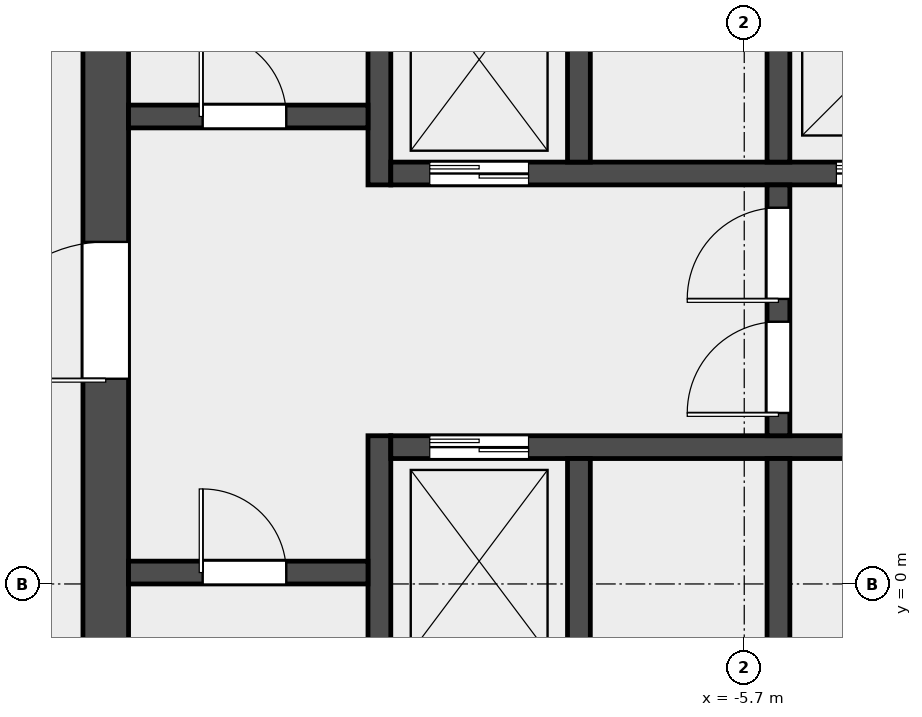
"""IFC4 building model, lengths in metres.
Left out: names, types, materials, properties, quantities, classifications, styles, units other than length and angle.
Written with IfcOpenShell. Run it as: python <this file> out.ifc"""

import sys

from ifc_helpers import new_model, si_unit, direction, frame, frame_2d, origin, place, context, subcontext, project, spatial, rectangle, extrude, element, fill, save


model = new_model("IFC4")
c1 = context("Model", 3, precision=1e-05, world=origin(), true_north=direction((0.0, 1.0)))
c2 = subcontext(c1, "Body", "Model", "MODEL_VIEW")
j1 = project(units=[si_unit("LENGTHUNIT", "METRE"), si_unit("PLANEANGLEUNIT", "RADIAN")], contexts=[c1])
p1 = place(None, origin())
s1 = spatial("IfcSite", under=j1, at=p1, CompositionType="ELEMENT")
p2 = place(p1, origin())
s2 = spatial("IfcBuilding", under=s1, at=p2, CompositionType="ELEMENT")
p3 = place(p2, frame((0.0, 0.0, 211.0)))
s3 = spatial("IfcBuildingStorey", under=s2, at=p3, CompositionType="ELEMENT", Elevation=211.0)
p4 = place(p3, frame((-14.1, -6.6, 0.0), z_axis=(0.0, 0.0, 1.0), x_axis=(0.0, 1.0, 0.0)))
e1 = element("IfcWall", 1, at=p4, inside=s3, PredefinedType="SHEAR", context=c2, shape_type="SweptSolid", body=[
    extrude(rectangle(XDim=19.5, YDim=0.6, at=frame_2d((9.75, 0.0))), origin(), (0.0, 0.0, 1.0), 3.7),
])
p5 = place(p4, frame((9.3, 0.0, 0.0)))
e2 = element("IfcOpeningElement", 2, at=p5, cuts=e1, PredefinedType="OPENING", context=c2, shape_type="SweptSolid", body=[
    extrude(rectangle(XDim=1.8, YDim=2.1, at=frame_2d((0.9, 1.05))), frame((0.0, 0.312, 0.0), z_axis=(0.0, -1.0, 0.0), x_axis=(1.0, 0.0, 0.0)), (0.0, 0.0, 1.0), 0.624),
])
p6 = place(p3, frame((-10.5, -6.6, 0.0), z_axis=(0.0, 0.0, 1.0), x_axis=(0.0, 1.0, 0.0)))
e3 = element("IfcWall", 3, at=p6, inside=s3, PredefinedType="SHEAR", context=c2, shape_type="SweptSolid", body=[
    extrude(rectangle(XDim=8.55, YDim=0.3, at=frame_2d((4.275, 0.0))), origin(), (0.0, 0.0, 1.0), 3.7),
])
p7 = place(p3, frame((-10.5, 5.25, 0.0), z_axis=(0.0, 0.0, 1.0), x_axis=(0.0, 1.0, 0.0)))
e4 = element("IfcWall", 4, at=p7, inside=s3, PredefinedType="SHEAR", context=c2, shape_type="SweptSolid", body=[
    extrude(rectangle(XDim=7.65, YDim=0.3, at=frame_2d((3.825, 0.0))), origin(), (0.0, 0.0, 1.0), 3.7),
])
p8 = place(p3, frame((-13.8, 0.15, 0.0), z_axis=(0.0, 0.0, 1.0), x_axis=(1.0, 0.0, 0.0)))
e5 = element("IfcWall", 5, at=p8, inside=s3, PredefinedType="SOLIDWALL", context=c2, shape_type="SweptSolid", body=[
    extrude(rectangle(XDim=3.15, YDim=0.3, at=frame_2d((1.575, 0.0))), origin(), (0.0, 0.0, 1.0), 3.7),
])
p9 = place(p8, frame((0.975, 0.0, 0.0)))
e6 = element("IfcOpeningElement", 6, at=p9, cuts=e5, PredefinedType="OPENING", context=c2, shape_type="SweptSolid", body=[
    extrude(rectangle(XDim=1.1, YDim=2.1, at=frame_2d((0.55, 1.05))), frame((0.0, 0.162, 0.0), z_axis=(0.0, -1.0, 0.0), x_axis=(1.0, 0.0, 0.0)), (0.0, 0.0, 1.0), 0.324),
])
p10 = place(p3, frame((-13.8, 6.15, 0.0), z_axis=(0.0, 0.0, 1.0), x_axis=(1.0, 0.0, 0.0)))
e7 = element("IfcWall", 7, at=p10, inside=s3, PredefinedType="SOLIDWALL", context=c2, shape_type="SweptSolid", body=[
    extrude(rectangle(XDim=3.15, YDim=0.3, at=frame_2d((1.575, 0.0))), origin(), (0.0, 0.0, 1.0), 3.7),
])
p11 = place(p10, frame((0.975, 0.0, 0.0)))
e8 = element("IfcOpeningElement", 8, at=p11, cuts=e7, PredefinedType="OPENING", context=c2, shape_type="SweptSolid", body=[
    extrude(rectangle(XDim=1.1, YDim=2.1, at=frame_2d((0.55, 1.05))), frame((0.0, 0.162, 0.0), z_axis=(0.0, -1.0, 0.0), x_axis=(1.0, 0.0, 0.0)), (0.0, 0.0, 1.0), 0.324),
])
p12 = place(p3, frame((-10.35, 1.8, 0.0), z_axis=(0.0, 0.0, 1.0), x_axis=(1.0, 0.0, 0.0)))
e9 = element("IfcWall", 9, at=p12, inside=s3, PredefinedType="SOLIDWALL", context=c2, shape_type="SweptSolid", body=[
    extrude(rectangle(XDim=20.7, YDim=0.3, at=frame_2d((10.35, 0.0))), origin(), (0.0, 0.0, 1.0), 3.7),
])
p13 = place(p12, frame((0.512, 0.0, 0.0)))
e10 = element("IfcOpeningElement", 10, at=p13, cuts=e9, PredefinedType="OPENING", context=c2, shape_type="SweptSolid", body=[
    extrude(rectangle(XDim=1.3, YDim=2.1, at=frame_2d((0.65, 1.05))), frame((0.0, 0.162, 0.0), z_axis=(0.0, -1.0, 0.0), x_axis=(1.0, 0.0, 0.0)), (0.0, 0.0, 1.0), 0.324),
])
p14 = place(p12, frame((7.225, 0.0, 0.0)))
e11 = element("IfcOpeningElement", 11, at=p14, cuts=e9, PredefinedType="OPENING", context=c2, shape_type="SweptSolid", body=[
    extrude(rectangle(XDim=1.0, YDim=2.1, at=frame_2d((0.5, 1.05))), frame((0.0, 0.162, 0.0), z_axis=(0.0, -1.0, 0.0), x_axis=(1.0, 0.0, 0.0)), (0.0, 0.0, 1.0), 0.324),
])
p15 = place(p12, frame((12.475, 0.0, 0.0)))
e12 = element("IfcOpeningElement", 12, at=p15, cuts=e9, PredefinedType="OPENING", context=c2, shape_type="SweptSolid", body=[
    extrude(rectangle(XDim=1.0, YDim=2.1, at=frame_2d((0.5, 1.05))), frame((0.0, 0.162, 0.0), z_axis=(0.0, -1.0, 0.0), x_axis=(1.0, 0.0, 0.0)), (0.0, 0.0, 1.0), 0.324),
])
p16 = place(p12, frame((16.413, 0.0, 0.0)))
e13 = element("IfcOpeningElement", 13, at=p16, cuts=e9, PredefinedType="OPENING", context=c2, shape_type="SweptSolid", body=[
    extrude(rectangle(XDim=1.0, YDim=2.1, at=frame_2d((0.5, 1.05))), frame((0.0, 0.162, 0.0), z_axis=(0.0, -1.0, 0.0), x_axis=(1.0, 0.0, 0.0)), (0.0, 0.0, 1.0), 0.324),
])
p17 = place(p12, frame((19.038, 0.0, 0.0)))
e14 = element("IfcOpeningElement", 14, at=p17, cuts=e9, PredefinedType="OPENING", context=c2, shape_type="SweptSolid", body=[
    extrude(rectangle(XDim=1.0, YDim=2.1, at=frame_2d((0.5, 1.05))), frame((0.0, 0.162, 0.0), z_axis=(0.0, -1.0, 0.0), x_axis=(1.0, 0.0, 0.0)), (0.0, 0.0, 1.0), 0.324),
])
p18 = place(p3, frame((-10.35, 5.4, 0.0), z_axis=(0.0, 0.0, 1.0), x_axis=(1.0, 0.0, 0.0)))
e15 = element("IfcWall", 15, at=p18, inside=s3, PredefinedType="SOLIDWALL", context=c2, shape_type="SweptSolid", body=[
    extrude(rectangle(XDim=20.7, YDim=0.3, at=frame_2d((10.35, 0.0))), origin(), (0.0, 0.0, 1.0), 3.7),
])
p19 = place(p18, frame((0.512, 0.0, 0.0)))
e16 = element("IfcOpeningElement", 16, at=p19, cuts=e15, PredefinedType="OPENING", context=c2, shape_type="SweptSolid", body=[
    extrude(rectangle(XDim=1.3, YDim=2.1, at=frame_2d((0.65, 1.05))), frame((0.0, 0.162, 0.0), z_axis=(0.0, -1.0, 0.0), x_axis=(1.0, 0.0, 0.0)), (0.0, 0.0, 1.0), 0.324),
])
p20 = place(p18, frame((5.863, 0.0, 0.0)))
e17 = element("IfcOpeningElement", 17, at=p20, cuts=e15, PredefinedType="OPENING", context=c2, shape_type="SweptSolid", body=[
    extrude(rectangle(XDim=1.1, YDim=2.1, at=frame_2d((0.55, 1.05))), frame((0.0, 0.162, 0.0), z_axis=(0.0, -1.0, 0.0), x_axis=(1.0, 0.0, 0.0)), (0.0, 0.0, 1.0), 0.324),
])
p21 = place(p18, frame((8.488, 0.0, 0.0)))
e18 = element("IfcOpeningElement", 18, at=p21, cuts=e15, PredefinedType="OPENING", context=c2, shape_type="SweptSolid", body=[
    extrude(rectangle(XDim=1.1, YDim=2.1, at=frame_2d((0.55, 1.05))), frame((0.0, 0.162, 0.0), z_axis=(0.0, -1.0, 0.0), x_axis=(1.0, 0.0, 0.0)), (0.0, 0.0, 1.0), 0.324),
])
p22 = place(p18, frame((11.113, 0.0, 0.0)))
e19 = element("IfcOpeningElement", 19, at=p22, cuts=e15, PredefinedType="OPENING", context=c2, shape_type="SweptSolid", body=[
    extrude(rectangle(XDim=1.1, YDim=2.1, at=frame_2d((0.55, 1.05))), frame((0.0, 0.162, 0.0), z_axis=(0.0, -1.0, 0.0), x_axis=(1.0, 0.0, 0.0)), (0.0, 0.0, 1.0), 0.324),
])
p23 = place(p18, frame((13.738, 0.0, 0.0)))
e20 = element("IfcOpeningElement", 20, at=p23, cuts=e15, PredefinedType="OPENING", context=c2, shape_type="SweptSolid", body=[
    extrude(rectangle(XDim=1.1, YDim=2.1, at=frame_2d((0.55, 1.05))), frame((0.0, 0.162, 0.0), z_axis=(0.0, -1.0, 0.0), x_axis=(1.0, 0.0, 0.0)), (0.0, 0.0, 1.0), 0.324),
])
p24 = place(p18, frame((16.363, 0.0, 0.0)))
e21 = element("IfcOpeningElement", 21, at=p24, cuts=e15, PredefinedType="OPENING", context=c2, shape_type="SweptSolid", body=[
    extrude(rectangle(XDim=1.1, YDim=2.1, at=frame_2d((0.55, 1.05))), frame((0.0, 0.162, 0.0), z_axis=(0.0, -1.0, 0.0), x_axis=(1.0, 0.0, 0.0)), (0.0, 0.0, 1.0), 0.324),
])
p25 = place(p18, frame((18.988, 0.0, 0.0)))
e22 = element("IfcOpeningElement", 22, at=p25, cuts=e15, PredefinedType="OPENING", context=c2, shape_type="SweptSolid", body=[
    extrude(rectangle(XDim=1.1, YDim=2.1, at=frame_2d((0.55, 1.05))), frame((0.0, 0.162, 0.0), z_axis=(0.0, -1.0, 0.0), x_axis=(1.0, 0.0, 0.0)), (0.0, 0.0, 1.0), 0.324),
])
for number, where, z_axis, x_axis in (
    (23, (-7.875, -1.05, 0.0), (0.0, 0.0, 1.0), (0.0, 1.0, 0.0)),
    (24, (-5.25, -1.05, 0.0), (0.0, 0.0, 1.0), (0.0, 1.0, 0.0)),
    (25, (-7.875, 5.55, 0.0), (0.0, 0.0, 1.0), (0.0, 1.0, 0.0)),
    (26, (-5.25, 5.55, 0.0), (0.0, 0.0, 1.0), (0.0, 1.0, 0.0)),
):
    element("IfcWall", number, at=place(p3, frame(where, z_axis=z_axis, x_axis=x_axis)), inside=s3, PredefinedType="SOLIDWALL", context=c2, shape_type="SweptSolid", body=[
        extrude(rectangle(XDim=2.7, YDim=0.3, at=frame_2d((1.35, 0.0))), origin(), (0.0, 0.0, 1.0), 3.7),
    ])
p26 = place(p3, frame((-5.25, 1.95, 0.0), z_axis=(0.0, 0.0, 1.0), x_axis=(0.0, 1.0, 0.0)))
e27 = element("IfcWall", 27, at=p26, inside=s3, PredefinedType="SOLIDWALL", context=c2, shape_type="SweptSolid", body=[
    extrude(rectangle(XDim=3.3, YDim=0.3, at=frame_2d((1.65, 0.0))), origin(), (0.0, 0.0, 1.0), 3.7),
])
p27 = place(p26, frame((0.3, 0.0, 0.0)))
e28 = element("IfcOpeningElement", 28, at=p27, cuts=e27, PredefinedType="OPENING", context=c2, shape_type="SweptSolid", body=[
    extrude(rectangle(XDim=1.2, YDim=2.1, at=frame_2d((0.6, 1.05))), frame((0.0, 0.162, 0.0), z_axis=(0.0, -1.0, 0.0), x_axis=(1.0, 0.0, 0.0)), (0.0, 0.0, 1.0), 0.324),
])
p28 = place(p26, frame((1.8, 0.0, 0.0)))
e29 = element("IfcOpeningElement", 29, at=p28, cuts=e27, PredefinedType="OPENING", context=c2, shape_type="SweptSolid", body=[
    extrude(rectangle(XDim=1.2, YDim=2.1, at=frame_2d((0.6, 1.05))), frame((0.0, 0.162, 0.0), z_axis=(0.0, -1.0, 0.0), x_axis=(1.0, 0.0, 0.0)), (0.0, 0.0, 1.0), 0.324),
])
p29 = place(p9, origin())
e30 = element("IfcDoor", 30, at=p29, inside=s3, OperationType="SINGLE_SWING_LEFT", PredefinedType="DOOR", context=c2, shape_type="SweptSolid", body=[
    extrude(rectangle(XDim=1.1, YDim=2.1, at=frame_2d((0.55, 1.05))), frame((0.0, 0.025, 0.0), z_axis=(0.0, -1.0, 0.0), x_axis=(1.0, 0.0, 0.0)), (0.0, 0.0, 1.0), 0.05),
])
fill(e6, e30)
p30 = place(p11, origin())
e31 = element("IfcDoor", 31, at=p30, inside=s3, OperationType="SINGLE_SWING_LEFT", PredefinedType="DOOR", context=c2, shape_type="SweptSolid", body=[
    extrude(rectangle(XDim=1.1, YDim=2.1, at=frame_2d((0.55, 1.05))), frame((0.0, 0.025, 0.0), z_axis=(0.0, -1.0, 0.0), x_axis=(1.0, 0.0, 0.0)), (0.0, 0.0, 1.0), 0.05),
])
fill(e8, e31)
p31 = place(p5, origin())
e32 = element("IfcDoor", 32, at=p31, inside=s3, OperationType="DOUBLE_DOOR_SINGLE_SWING", PredefinedType="DOOR", context=c2, shape_type="SweptSolid", body=[
    extrude(rectangle(XDim=1.8, YDim=2.1, at=frame_2d((0.9, 1.05))), frame((0.0, 0.025, 0.0), z_axis=(0.0, -1.0, 0.0), x_axis=(1.0, 0.0, 0.0)), (0.0, 0.0, 1.0), 0.05),
])
fill(e2, e32)
p32 = place(p27, origin())
e33 = element("IfcDoor", 33, at=p32, inside=s3, OperationType="SINGLE_SWING_LEFT", PredefinedType="DOOR", context=c2, shape_type="SweptSolid", body=[
    extrude(rectangle(XDim=1.2, YDim=2.1, at=frame_2d((0.6, 1.05))), frame((0.0, 0.025, 0.0), z_axis=(0.0, -1.0, 0.0), x_axis=(1.0, 0.0, 0.0)), (0.0, 0.0, 1.0), 0.05),
])
fill(e28, e33)
p33 = place(p28, origin())
e34 = element("IfcDoor", 34, at=p33, inside=s3, OperationType="SINGLE_SWING_RIGHT", PredefinedType="DOOR", context=c2, shape_type="SweptSolid", body=[
    extrude(rectangle(XDim=1.2, YDim=2.1, at=frame_2d((0.6, 1.05))), frame((0.0, 0.025, 0.0), z_axis=(0.0, -1.0, 0.0), x_axis=(1.0, 0.0, 0.0)), (0.0, 0.0, 1.0), 0.05),
])
fill(e29, e34)
p34 = place(p13, origin())
e35 = element("IfcDoor", 35, at=p34, inside=s3, OperationType="DOUBLE_DOOR_SLIDING", PredefinedType="DOOR", context=c2, shape_type="SweptSolid", body=[
    extrude(rectangle(XDim=1.3, YDim=2.1, at=frame_2d((0.65, 1.05))), frame((0.0, 0.025, 0.0), z_axis=(0.0, -1.0, 0.0), x_axis=(1.0, 0.0, 0.0)), (0.0, 0.0, 1.0), 0.05),
])
fill(e10, e35)
p35 = place(p19, origin())
e36 = element("IfcDoor", 36, at=p35, inside=s3, OperationType="DOUBLE_DOOR_SLIDING", PredefinedType="DOOR", context=c2, shape_type="SweptSolid", body=[
    extrude(rectangle(XDim=1.3, YDim=2.1, at=frame_2d((0.65, 1.05))), frame((0.0, 0.025, 0.0), z_axis=(0.0, -1.0, 0.0), x_axis=(1.0, 0.0, 0.0)), (0.0, 0.0, 1.0), 0.05),
])
fill(e16, e36)
p36 = place(p20, origin())
e37 = element("IfcDoor", 37, at=p36, inside=s3, OperationType="DOUBLE_DOOR_SLIDING", PredefinedType="DOOR", context=c2, shape_type="SweptSolid", body=[
    extrude(rectangle(XDim=1.1, YDim=2.1, at=frame_2d((0.55, 1.05))), frame((0.0, 0.025, 0.0), z_axis=(0.0, -1.0, 0.0), x_axis=(1.0, 0.0, 0.0)), (0.0, 0.0, 1.0), 0.05),
])
fill(e17, e37)
save(model, sys.argv[1])
